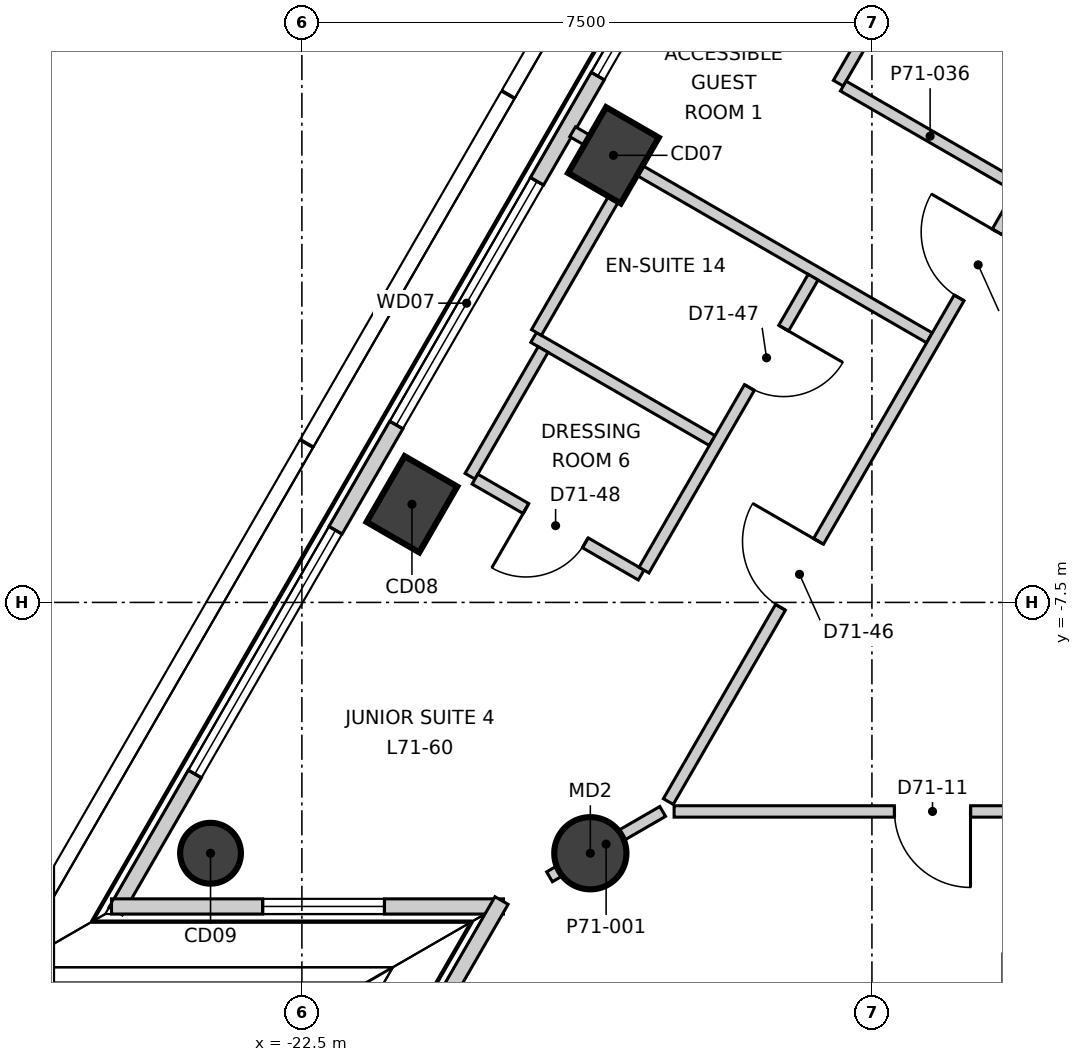
"""IFC4 building model, lengths in metres.
Left out: names, types, materials, properties, quantities, classifications, styles, units other than length and angle.
Written with IfcOpenShell. Run it as: python <this file> out.ifc"""

import sys

from ifc_helpers import new_model, si_unit, direction, frame, frame_2d, origin, origin_2d, place, context, subcontext, project, spatial, rectangle, circle, extrude, element, fill, save


model = new_model("IFC4")
c1 = context("Model", 3, precision=1e-05, world=origin(), true_north=direction((0.0, 1.0)))
c2 = subcontext(c1, "Body", "Model", "MODEL_VIEW")
j1 = project(units=[si_unit("LENGTHUNIT", "METRE"), si_unit("PLANEANGLEUNIT", "RADIAN")], contexts=[c1])
p1 = place(None, origin())
s1 = spatial("IfcSite", under=j1, at=p1, CompositionType="ELEMENT")
p2 = place(p1, origin())
s2 = spatial("IfcBuilding", under=s1, at=p2, CompositionType="ELEMENT")
p3 = place(p2, frame((0.0, 0.0, 300.7)))
s3 = spatial("IfcBuildingStorey", under=s2, at=p3, CompositionType="ELEMENT", Elevation=300.7)
for number, where, z_axis, x_axis in (
    (1, (-18.401, -1.618, -0.3), (0.0, 0.0, 1.0), (0.5, 0.866, 0.0)),
    (2, (-21.052, -6.209, -0.3), (0.0, 0.0, 1.0), (0.5, 0.866, 0.0)),
):
    element("IfcColumn", number, at=place(p3, frame(where, z_axis=z_axis, x_axis=x_axis)), inside=s3, PredefinedType="COLUMN", context=c2, shape_type="SweptSolid", body=[
        extrude(rectangle(XDim=1.0, YDim=0.8, at=origin_2d()), origin(), (0.0, 0.0, 1.0), 3.6),
    ])
p4 = place(p3, frame((-23.702, -10.8, -0.3), z_axis=(0.0, 0.0, 1.0), x_axis=(0.5, 0.866025403784, 0.0)))
e3 = element("IfcColumn", 3, at=p4, inside=s3, PredefinedType="COLUMN", context=c2, shape_type="SweptSolid", body=[
    extrude(circle(Radius=0.4, at=origin_2d()), origin(), (0.0, 0.0, 1.0), 3.6),
])
p5 = place(p3, frame((-18.705, -10.8, -0.3), z_axis=(0.0, 0.0, 1.0), x_axis=(1.0, 0.0, 0.0)))
e4 = element("IfcColumn", 4, at=p5, inside=s3, PredefinedType="COLUMN", context=c2, shape_type="SweptSolid", body=[
    extrude(circle(Radius=0.475, at=origin_2d()), origin(), (0.0, 0.0, 1.0), 3.6),
])
p6 = place(p3, frame((-2.453, 27.405, 0.0), z_axis=(0.0, 0.0, 1.0), x_axis=(-0.500000041859, -0.866025379617, 0.0)))
e5 = element("IfcWall", 5, at=p6, inside=s3, PredefinedType="ELEMENTEDWALL", context=c2, shape_type="SweptSolid", body=[
    extrude(rectangle(XDim=44.994, YDim=0.2, at=frame_2d((22.497, 0.0))), origin(), (0.0, 0.0, 1.0), 3.3),
])
p7 = place(p6, frame((2.103, 0.0, 0.9)))
e6 = element("IfcOpeningElement", 6, at=p7, cuts=e5, PredefinedType="OPENING", context=c2, shape_type="SweptSolid", body=[
    extrude(rectangle(XDim=3.7, YDim=2.2, at=frame_2d((1.85, 1.1))), frame((0.0, 0.11, 0.0), z_axis=(0.0, -1.0, 0.0), x_axis=(1.0, 0.0, 0.0)), (0.0, 0.0, 1.0), 0.22),
])
p8 = place(p6, frame((7.404, 0.0, 0.9)))
e7 = element("IfcOpeningElement", 7, at=p8, cuts=e5, PredefinedType="OPENING", context=c2, shape_type="SweptSolid", body=[
    extrude(rectangle(XDim=3.7, YDim=2.2, at=frame_2d((1.85, 1.1))), frame((0.0, 0.11, 0.0), z_axis=(0.0, -1.0, 0.0), x_axis=(1.0, 0.0, 0.0)), (0.0, 0.0, 1.0), 0.22),
])
p9 = place(p6, frame((12.705, 0.0, 0.9)))
e8 = element("IfcOpeningElement", 8, at=p9, cuts=e5, PredefinedType="OPENING", context=c2, shape_type="SweptSolid", body=[
    extrude(rectangle(XDim=3.7, YDim=2.2, at=frame_2d((1.85, 1.1))), frame((0.0, 0.11, 0.0), z_axis=(0.0, -1.0, 0.0), x_axis=(1.0, 0.0, 0.0)), (0.0, 0.0, 1.0), 0.22),
])
p10 = place(p6, frame((18.006, 0.0, 0.9)))
e9 = element("IfcOpeningElement", 9, at=p10, cuts=e5, PredefinedType="OPENING", context=c2, shape_type="SweptSolid", body=[
    extrude(rectangle(XDim=3.7, YDim=2.2, at=frame_2d((1.85, 1.1))), frame((0.0, 0.11, 0.0), z_axis=(0.0, -1.0, 0.0), x_axis=(1.0, 0.0, 0.0)), (0.0, 0.0, 1.0), 0.22),
])
p11 = place(p6, frame((23.307, 0.0, 0.9)))
e10 = element("IfcOpeningElement", 10, at=p11, cuts=e5, PredefinedType="OPENING", context=c2, shape_type="SweptSolid", body=[
    extrude(rectangle(XDim=3.7, YDim=2.2, at=frame_2d((1.85, 1.1))), frame((0.0, 0.11, 0.0), z_axis=(0.0, -1.0, 0.0), x_axis=(1.0, 0.0, 0.0)), (0.0, 0.0, 1.0), 0.22),
])
p12 = place(p6, frame((28.608, 0.0, 0.9)))
e11 = element("IfcOpeningElement", 11, at=p12, cuts=e5, PredefinedType="OPENING", context=c2, shape_type="SweptSolid", body=[
    extrude(rectangle(XDim=3.7, YDim=2.2, at=frame_2d((1.85, 1.1))), frame((0.0, 0.11, 0.0), z_axis=(0.0, -1.0, 0.0), x_axis=(1.0, 0.0, 0.0)), (0.0, 0.0, 1.0), 0.22),
])
p13 = place(p6, frame((33.909, 0.0, 0.9)))
e12 = element("IfcOpeningElement", 12, at=p13, cuts=e5, PredefinedType="OPENING", context=c2, shape_type="SweptSolid", body=[
    extrude(rectangle(XDim=3.7, YDim=2.2, at=frame_2d((1.85, 1.1))), frame((0.0, 0.11, 0.0), z_axis=(0.0, -1.0, 0.0), x_axis=(1.0, 0.0, 0.0)), (0.0, 0.0, 1.0), 0.22),
])
p14 = place(p6, frame((39.21, 0.0, 0.9)))
e13 = element("IfcOpeningElement", 13, at=p14, cuts=e5, PredefinedType="OPENING", context=c2, shape_type="SweptSolid", body=[
    extrude(rectangle(XDim=3.7, YDim=2.2, at=frame_2d((1.85, 1.1))), frame((0.0, 0.11, 0.0), z_axis=(0.0, -1.0, 0.0), x_axis=(1.0, 0.0, 0.0)), (0.0, 0.0, 1.0), 0.22),
])
p15 = place(p3, frame((-25.005, -11.5, 0.0), z_axis=(0.0, 0.0, 1.0), x_axis=(1.0, 0.0, 0.0)))
e14 = element("IfcWall", 14, at=p15, inside=s3, PredefinedType="ELEMENTEDWALL", context=c2, shape_type="SweptSolid", body=[
    extrude(rectangle(XDim=5.157, YDim=0.2, at=frame_2d((2.579, 0.0))), origin(), (0.0, 0.0, 1.0), 3.3),
])
p16 = place(p15, frame((1.99, 0.0, 0.9)))
e15 = element("IfcOpeningElement", 15, at=p16, cuts=e14, PredefinedType="OPENING", context=c2, shape_type="SweptSolid", body=[
    extrude(rectangle(XDim=1.6, YDim=2.2, at=frame_2d((0.8, 1.1))), frame((0.0, 0.11, 0.0), z_axis=(0.0, -1.0, 0.0), x_axis=(1.0, 0.0, 0.0)), (0.0, 0.0, 1.0), 0.22),
])
p17 = place(p3, frame((-19.873, -11.422, 0.0), z_axis=(0.0, 0.0, 1.0), x_axis=(-0.500074877135, -0.865982169134, 0.0)))
e16 = element("IfcWall", 16, at=p17, inside=s3, PredefinedType="ELEMENTEDWALL", context=c2, shape_type="SweptSolid", body=[
    extrude(rectangle(XDim=5.157, YDim=0.2, at=frame_2d((2.579, 0.0))), origin(), (0.0, 0.0, 1.0), 3.3),
])
p18 = place(p17, frame((1.39, 0.0, 0.9)))
e17 = element("IfcOpeningElement", 17, at=p18, cuts=e16, PredefinedType="OPENING", context=c2, shape_type="SweptSolid", body=[
    extrude(rectangle(XDim=1.6, YDim=2.2, at=frame_2d((0.8, 1.1))), frame((0.0, 0.11, 0.0), z_axis=(0.0, -1.0, 0.0), x_axis=(1.0, 0.0, 0.0)), (0.0, 0.0, 1.0), 0.22),
])
p19 = place(p3, frame((-19.242, -11.11, 0.0), z_axis=(0.0, 0.0, 1.0), x_axis=(0.86591836888, 0.500185344083, 0.0)))
e18 = element("IfcWall", 18, at=p19, inside=s3, PredefinedType="PARTITIONING", context=c2, shape_type="SweptSolid", body=[
    extrude(rectangle(XDim=1.719, YDim=0.15, at=frame_2d((0.86, 0.0))), origin(), (0.0, 0.0, 1.0), 2.8),
])
p20 = place(p3, frame((-18.938, -1.308, 0.0), z_axis=(0.0, 0.0, 1.0), x_axis=(0.866006352826, -0.500032995777, 0.0)))
e19 = element("IfcWall", 19, at=p20, inside=s3, PredefinedType="PARTITIONING", context=c2, shape_type="SweptSolid", body=[
    extrude(rectangle(XDim=5.422, YDim=0.15, at=frame_2d((2.711, 0.0))), origin(), (0.0, 0.0, 1.0), 3.3),
])
p21 = place(p3, frame((-17.603, -10.25, 0.0), z_axis=(0.0, 0.0, 1.0), x_axis=(1.0, 0.0, 0.0)))
e20 = element("IfcWall", 20, at=p21, inside=s3, PredefinedType="PARTITIONING", context=c2, shape_type="SweptSolid", body=[
    extrude(rectangle(XDim=35.356, YDim=0.15, at=frame_2d((17.678, 0.0))), origin(), (0.0, 0.0, 1.0), 3.3),
])
p22 = place(p21, frame((2.9, 0.0, 0.0)))
e21 = element("IfcOpeningElement", 21, at=p22, cuts=e20, PredefinedType="OPENING", context=c2, shape_type="SweptSolid", body=[
    extrude(rectangle(XDim=1.0, YDim=2.1, at=frame_2d((0.5, 1.05))), frame((0.0, 0.085, 0.0), z_axis=(0.0, -1.0, 0.0), x_axis=(1.0, 0.0, 0.0)), (0.0, 0.0, 1.0), 0.17),
])
p23 = place(p21, frame((10.351, 0.0, 0.0)))
e22 = element("IfcOpeningElement", 22, at=p23, cuts=e20, PredefinedType="OPENING", context=c2, shape_type="SweptSolid", body=[
    extrude(rectangle(XDim=1.0, YDim=2.1, at=frame_2d((0.5, 1.05))), frame((0.0, 0.085, 0.0), z_axis=(0.0, -1.0, 0.0), x_axis=(1.0, 0.0, 0.0)), (0.0, 0.0, 1.0), 0.17),
])
p24 = place(p21, frame((15.652, 0.0, 0.0)))
e23 = element("IfcOpeningElement", 23, at=p24, cuts=e20, PredefinedType="OPENING", context=c2, shape_type="SweptSolid", body=[
    extrude(rectangle(XDim=1.0, YDim=2.1, at=frame_2d((0.5, 1.05))), frame((0.0, 0.085, 0.0), z_axis=(0.0, -1.0, 0.0), x_axis=(1.0, 0.0, 0.0)), (0.0, 0.0, 1.0), 0.17),
])
p25 = place(p21, frame((24.753, 0.0, 0.0)))
e24 = element("IfcOpeningElement", 24, at=p25, cuts=e20, PredefinedType="OPENING", context=c2, shape_type="SweptSolid", body=[
    extrude(rectangle(XDim=1.0, YDim=2.1, at=frame_2d((0.5, 1.05))), frame((0.0, 0.085, 0.0), z_axis=(0.0, -1.0, 0.0), x_axis=(1.0, 0.0, 0.0)), (0.0, 0.0, 1.0), 0.17),
])
p26 = place(p21, frame((31.255, 0.0, 0.0)))
e25 = element("IfcOpeningElement", 25, at=p26, cuts=e20, PredefinedType="OPENING", context=c2, shape_type="SweptSolid", body=[
    extrude(rectangle(XDim=1.0, YDim=2.1, at=frame_2d((0.5, 1.05))), frame((0.0, 0.085, 0.0), z_axis=(0.0, -1.0, 0.0), x_axis=(1.0, 0.0, 0.0)), (0.0, 0.0, 1.0), 0.17),
])
p27 = place(p3, frame((-17.679, -10.12, 0.0), z_axis=(0.0, 0.0, 1.0), x_axis=(0.500008955215, 0.866020233427, 0.0)))
e26 = element("IfcWall", 26, at=p27, inside=s3, PredefinedType="PARTITIONING", context=c2, shape_type="SweptSolid", body=[
    extrude(rectangle(XDim=35.357, YDim=0.15, at=frame_2d((17.679, 0.0))), origin(), (0.0, 0.0, 1.0), 3.3),
])
p28 = place(p27, frame((31.307, 0.0, 0.0)))
e27 = element("IfcOpeningElement", 27, at=p28, cuts=e26, PredefinedType="OPENING", context=c2, shape_type="SweptSolid", body=[
    extrude(rectangle(XDim=1.0, YDim=2.1, at=frame_2d((0.5, 1.05))), frame((0.0, 0.085, 0.0), z_axis=(0.0, -1.0, 0.0), x_axis=(1.0, 0.0, 0.0)), (0.0, 0.0, 1.0), 0.17),
])
p29 = place(p27, frame((20.056, 0.0, 0.0)))
e28 = element("IfcOpeningElement", 28, at=p29, cuts=e26, PredefinedType="OPENING", context=c2, shape_type="SweptSolid", body=[
    extrude(rectangle(XDim=1.0, YDim=2.1, at=frame_2d((0.5, 1.05))), frame((0.0, 0.085, 0.0), z_axis=(0.0, -1.0, 0.0), x_axis=(1.0, 0.0, 0.0)), (0.0, 0.0, 1.0), 0.17),
])
p30 = place(p27, frame((13.253, 0.0, 0.0)))
e29 = element("IfcOpeningElement", 29, at=p30, cuts=e26, PredefinedType="OPENING", context=c2, shape_type="SweptSolid", body=[
    extrude(rectangle(XDim=1.0, YDim=2.1, at=frame_2d((0.5, 1.05))), frame((0.0, 0.085, 0.0), z_axis=(0.0, -1.0, 0.0), x_axis=(1.0, 0.0, 0.0)), (0.0, 0.0, 1.0), 0.17),
])
p31 = place(p27, frame((7.653, 0.0, 0.0)))
e30 = element("IfcOpeningElement", 30, at=p31, cuts=e26, PredefinedType="OPENING", context=c2, shape_type="SweptSolid", body=[
    extrude(rectangle(XDim=1.0, YDim=2.1, at=frame_2d((0.5, 1.05))), frame((0.0, 0.085, 0.0), z_axis=(0.0, -1.0, 0.0), x_axis=(1.0, 0.0, 0.0)), (0.0, 0.0, 1.0), 0.17),
])
p32 = place(p27, frame((2.952, 0.0, 0.0)))
e31 = element("IfcOpeningElement", 31, at=p32, cuts=e26, PredefinedType="OPENING", context=c2, shape_type="SweptSolid", body=[
    extrude(rectangle(XDim=1.0, YDim=2.1, at=frame_2d((0.5, 1.05))), frame((0.0, 0.085, 0.0), z_axis=(0.0, -1.0, 0.0), x_axis=(1.0, 0.0, 0.0)), (0.0, 0.0, 1.0), 0.17),
])
p33 = place(p3, frame((-19.451, -4.014, 0.0), z_axis=(0.0, 0.0, 1.0), x_axis=(0.86594733563, -0.500135193638, 0.0)))
e32 = element("IfcWall", 32, at=p33, inside=s3, PredefinedType="PARTITIONING", context=c2, shape_type="SweptSolid", body=[
    extrude(rectangle(XDim=2.714, YDim=0.15, at=frame_2d((1.357, 0.0))), origin(), (0.0, 0.0, 1.0), 3.3),
])
p34 = place(p3, frame((-20.288, -5.84, 0.0), z_axis=(0.0, 0.0, 1.0), x_axis=(0.499890818081, 0.866088430819, 0.0)))
e33 = element("IfcWall", 33, at=p34, inside=s3, PredefinedType="PARTITIONING", context=c2, shape_type="SweptSolid", body=[
    extrude(rectangle(XDim=1.925, YDim=0.15, at=frame_2d((0.962, 0.0))), origin(), (0.0, 0.0, 1.0), 2.6),
])
p35 = place(p3, frame((-20.223, -5.878, 0.0), z_axis=(0.0, 0.0, 1.0), x_axis=(0.866146950478, -0.499789415832, 0.0)))
e34 = element("IfcWall", 34, at=p35, inside=s3, PredefinedType="PARTITIONING", context=c2, shape_type="SweptSolid", body=[
    extrude(rectangle(XDim=2.525, YDim=0.15, at=frame_2d((1.262, 0.0))), origin(), (0.0, 0.0, 1.0), 3.3),
])
p36 = place(p35, frame((0.775, 0.0, 0.0)))
e35 = element("IfcOpeningElement", 35, at=p36, cuts=e34, PredefinedType="OPENING", context=c2, shape_type="SweptSolid", body=[
    extrude(rectangle(XDim=0.9, YDim=2.1, at=frame_2d((0.45, 1.05))), frame((0.0, 0.085, 0.0), z_axis=(0.0, -1.0, 0.0), x_axis=(1.0, 0.0, 0.0)), (0.0, 0.0, 1.0), 0.17),
])
p37 = place(p3, frame((-17.999, -7.075, 0.0), z_axis=(0.0, 0.0, 1.0), x_axis=(0.49999788721, 0.866026623601, 0.0)))
e36 = element("IfcWall", 36, at=p37, inside=s3, PredefinedType="PARTITIONING", context=c2, shape_type="SweptSolid", body=[
    extrude(rectangle(XDim=4.45, YDim=0.15, at=frame_2d((2.225, 0.0))), origin(), (0.0, 0.0, 1.0), 3.3),
])
p38 = place(p37, frame((2.775, 0.0, 0.0)))
e37 = element("IfcOpeningElement", 37, at=p38, cuts=e36, PredefinedType="OPENING", context=c2, shape_type="SweptSolid", body=[
    extrude(rectangle(XDim=0.9, YDim=2.1, at=frame_2d((0.45, 1.05))), frame((0.0, 0.085, 0.0), z_axis=(0.0, -1.0, 0.0), x_axis=(1.0, 0.0, 0.0)), (0.0, 0.0, 1.0), 0.17),
])
p39 = place(p3, frame((-19.414, -3.949, 0.0), z_axis=(0.0, 0.0, 1.0), x_axis=(0.499975448907, 0.8660395779, 0.0)))
e38 = element("IfcWall", 38, at=p39, inside=s3, PredefinedType="PARTITIONING", context=c2, shape_type="SweptSolid", body=[
    extrude(rectangle(XDim=2.45, YDim=0.15, at=frame_2d((1.225, 0.0))), origin(), (0.0, 0.0, 1.0), 2.6),
])
p40 = place(p3, frame((-15.442, -0.669, 0.0), z_axis=(0.0, 0.0, 1.0), x_axis=(0.499874209568, 0.866098016745, 0.0)))
e39 = element("IfcWall", 39, at=p40, inside=s3, PredefinedType="PARTITIONING", context=c2, shape_type="SweptSolid", body=[
    extrude(rectangle(XDim=2.925, YDim=0.15, at=frame_2d((1.462, 0.0))), origin(), (0.0, 0.0, 1.0), 3.3),
])
p41 = place(p40, frame((1.05, 0.0, 0.0)))
e40 = element("IfcOpeningElement", 40, at=p41, cuts=e39, PredefinedType="OPENING", context=c2, shape_type="SweptSolid", body=[
    extrude(rectangle(XDim=0.9, YDim=2.1, at=frame_2d((0.45, 1.05))), frame((0.0, 0.085, 0.0), z_axis=(0.0, -1.0, 0.0), x_axis=(1.0, 0.0, 0.0)), (0.0, 0.0, 1.0), 0.17),
])
p42 = place(p3, frame((-15.377, -0.707, 0.0), z_axis=(0.0, 0.0, 1.0), x_axis=(0.86608234587, -0.499901360443, 0.0)))
e41 = element("IfcWall", 41, at=p42, inside=s3, PredefinedType="PARTITIONING", context=c2, shape_type="SweptSolid", body=[
    extrude(rectangle(XDim=2.638, YDim=0.15, at=frame_2d((1.319, 0.0))), origin(), (0.0, 0.0, 1.0), 3.3),
])
p43 = place(p12, origin())
e42 = element("IfcWindow", 42, at=p43, inside=s3, PartitioningType="SINGLE_PANEL", PredefinedType="WINDOW", context=c2, shape_type="SweptSolid", body=[
    extrude(rectangle(XDim=3.7, YDim=2.2, at=frame_2d((1.85, 1.1))), frame((0.0, 0.03, 0.0), z_axis=(0.0, -1.0, 0.0), x_axis=(1.0, 0.0, 0.0)), (0.0, 0.0, 1.0), 0.06),
])
fill(e11, e42)
p44 = place(p13, origin())
e43 = element("IfcWindow", 43, at=p44, inside=s3, PartitioningType="SINGLE_PANEL", PredefinedType="WINDOW", context=c2, shape_type="SweptSolid", body=[
    extrude(rectangle(XDim=3.7, YDim=2.2, at=frame_2d((1.85, 1.1))), frame((0.0, 0.03, 0.0), z_axis=(0.0, -1.0, 0.0), x_axis=(1.0, 0.0, 0.0)), (0.0, 0.0, 1.0), 0.06),
])
fill(e12, e43)
p45 = place(p14, origin())
e44 = element("IfcWindow", 44, at=p45, inside=s3, PartitioningType="SINGLE_PANEL", PredefinedType="WINDOW", context=c2, shape_type="SweptSolid", body=[
    extrude(rectangle(XDim=3.7, YDim=2.2, at=frame_2d((1.85, 1.1))), frame((0.0, 0.03, 0.0), z_axis=(0.0, -1.0, 0.0), x_axis=(1.0, 0.0, 0.0)), (0.0, 0.0, 1.0), 0.06),
])
fill(e13, e44)
p46 = place(p16, origin())
e45 = element("IfcWindow", 45, at=p46, inside=s3, PartitioningType="SINGLE_PANEL", PredefinedType="WINDOW", context=c2, shape_type="SweptSolid", body=[
    extrude(rectangle(XDim=1.6, YDim=2.2, at=frame_2d((0.8, 1.1))), frame((0.0, 0.03, 0.0), z_axis=(0.0, -1.0, 0.0), x_axis=(1.0, 0.0, 0.0)), (0.0, 0.0, 1.0), 0.06),
])
fill(e15, e45)
p47 = place(p22, origin())
e46 = element("IfcDoor", 46, at=p47, inside=s3, OperationType="SINGLE_SWING_RIGHT", PredefinedType="DOOR", context=c2, shape_type="SweptSolid", body=[
    extrude(rectangle(XDim=1.0, YDim=2.1, at=frame_2d((0.5, 1.05))), frame((0.0, 0.025, 0.0), z_axis=(0.0, -1.0, 0.0), x_axis=(1.0, 0.0, 0.0)), (0.0, 0.0, 1.0), 0.05),
])
fill(e21, e46)
p48 = place(p31, origin())
e47 = element("IfcDoor", 47, at=p48, inside=s3, OperationType="SINGLE_SWING_LEFT", PredefinedType="DOOR", context=c2, shape_type="SweptSolid", body=[
    extrude(rectangle(XDim=1.0, YDim=2.1, at=frame_2d((0.5, 1.05))), frame((0.0, 0.025, 0.0), z_axis=(0.0, -1.0, 0.0), x_axis=(1.0, 0.0, 0.0)), (0.0, 0.0, 1.0), 0.05),
])
fill(e30, e47)
p49 = place(p32, origin())
e48 = element("IfcDoor", 48, at=p49, inside=s3, OperationType="SINGLE_SWING_LEFT", PredefinedType="DOOR", context=c2, shape_type="SweptSolid", body=[
    extrude(rectangle(XDim=1.0, YDim=2.1, at=frame_2d((0.5, 1.05))), frame((0.0, 0.025, 0.0), z_axis=(0.0, -1.0, 0.0), x_axis=(1.0, 0.0, 0.0)), (0.0, 0.0, 1.0), 0.05),
])
fill(e31, e48)
p50 = place(p38, origin())
e49 = element("IfcDoor", 49, at=p50, inside=s3, OperationType="SINGLE_SWING_RIGHT", PredefinedType="DOOR", context=c2, shape_type="SweptSolid", body=[
    extrude(rectangle(XDim=0.9, YDim=2.1, at=frame_2d((0.45, 1.05))), frame((0.0, 0.025, 0.0), z_axis=(0.0, -1.0, 0.0), x_axis=(1.0, 0.0, 0.0)), (0.0, 0.0, 1.0), 0.05),
])
fill(e37, e49)
p51 = place(p36, origin())
e50 = element("IfcDoor", 50, at=p51, inside=s3, OperationType="SINGLE_SWING_LEFT", PredefinedType="DOOR", context=c2, shape_type="SweptSolid", body=[
    extrude(rectangle(XDim=0.9, YDim=2.1, at=frame_2d((0.45, 1.05))), frame((0.0, 0.025, 0.0), z_axis=(0.0, -1.0, 0.0), x_axis=(1.0, 0.0, 0.0)), (0.0, 0.0, 1.0), 0.05),
])
fill(e35, e50)
save(model, sys.argv[1])
